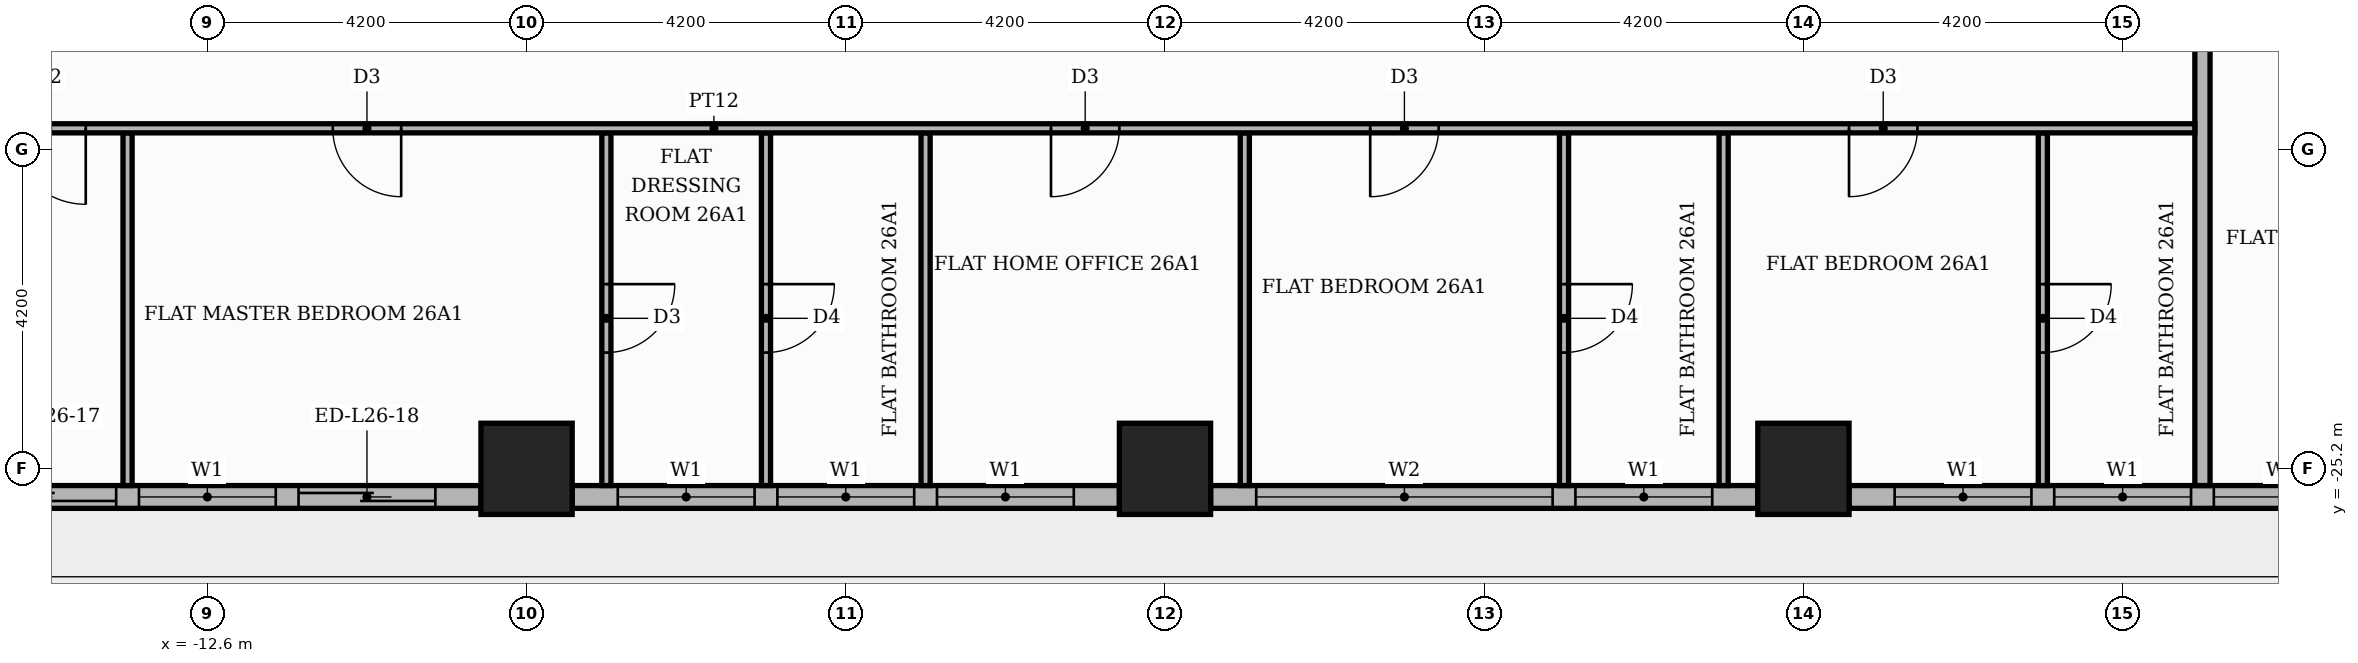
"""IFC4 building model, lengths in metres.
Left out: names, types, materials, properties, quantities, classifications, styles, units other than length and angle.
Written with IfcOpenShell. Run it as: python <this file> out.ifc"""

import sys

from ifc_helpers import new_model, si_unit, direction, frame, frame_2d, origin, origin_2d, place, context, subcontext, project, spatial, rectangle, extrude, element, fill, save


model = new_model("IFC4")
c1 = context("Model", 3, precision=1e-05, world=origin(), true_north=direction((0.0, 1.0)))
c2 = subcontext(c1, "Body", "Model", "MODEL_VIEW")
j1 = project(units=[si_unit("LENGTHUNIT", "METRE"), si_unit("PLANEANGLEUNIT", "RADIAN")], contexts=[c1])
p1 = place(None, origin())
s1 = spatial("IfcSite", under=j1, at=p1, CompositionType="ELEMENT")
p2 = place(p1, origin())
s2 = spatial("IfcBuilding", under=s1, at=p2, CompositionType="ELEMENT")
p3 = place(p2, frame((0.0, 0.0, 110.4)))
s3 = spatial("IfcBuildingStorey", under=s2, at=p3, CompositionType="ELEMENT", Elevation=110.4)
for number, where, z_axis, x_axis in (
    (1, (0.0, -25.2, 0.0), (0.0, 0.0, 1.0), (1.0, 0.0, 0.0)),
    (2, (8.4, -25.2, 0.0), (0.0, 0.0, 1.0), (1.0, 0.0, 0.0)),
    (3, (-8.4, -25.2, 0.0), (0.0, 0.0, 1.0), (1.0, 0.0, 0.0)),
):
    element("IfcColumn", number, at=place(p3, frame(where, z_axis=z_axis, x_axis=x_axis)), inside=s3, PredefinedType="COLUMN", context=c2, shape_type="SweptSolid", body=[
        extrude(rectangle(XDim=1.2, YDim=1.2, at=origin_2d()), origin(), (0.0, 0.0, 1.0), 3.9),
    ])
p4 = place(p3, frame((-16.2, -25.57, 0.0), z_axis=(0.0, 0.0, 1.0), x_axis=(1.0, 0.0, 0.0)))
e4 = element("IfcWall", 4, at=p4, inside=s3, PredefinedType="STANDARD", context=c2, shape_type="SweptSolid", body=[
    extrude(rectangle(XDim=7.2, YDim=0.3, at=frame_2d((3.6, 0.0))), origin(), (0.0, 0.0, 1.0), 3.48),
])
p5 = place(p4, frame((0.6, 0.0, 0.0)))
e5 = element("IfcOpeningElement", 5, at=p5, cuts=e4, PredefinedType="OPENING", context=c2, shape_type="SweptSolid", body=[
    extrude(rectangle(XDim=1.8, YDim=2.4, at=frame_2d((0.9, 1.2))), frame((0.0, 0.16, 0.0), z_axis=(0.0, -1.0, 0.0), x_axis=(1.0, 0.0, 0.0)), (0.0, 0.0, 1.0), 0.32),
])
p6 = place(p4, frame((2.7, 0.0, 0.9)))
e6 = element("IfcOpeningElement", 6, at=p6, cuts=e4, PredefinedType="OPENING", context=c2, shape_type="SweptSolid", body=[
    extrude(rectangle(XDim=1.8, YDim=2.1, at=frame_2d((0.9, 1.05))), frame((0.0, 0.16, 0.0), z_axis=(0.0, -1.0, 0.0), x_axis=(1.0, 0.0, 0.0)), (0.0, 0.0, 1.0), 0.32),
])
p7 = place(p4, frame((4.8, 0.0, 0.0)))
e7 = element("IfcOpeningElement", 7, at=p7, cuts=e4, PredefinedType="OPENING", context=c2, shape_type="SweptSolid", body=[
    extrude(rectangle(XDim=1.8, YDim=2.4, at=frame_2d((0.9, 1.2))), frame((0.0, 0.16, 0.0), z_axis=(0.0, -1.0, 0.0), x_axis=(1.0, 0.0, 0.0)), (0.0, 0.0, 1.0), 0.32),
])
p8 = place(p3, frame((-7.8, -25.57, 0.0), z_axis=(0.0, 0.0, 1.0), x_axis=(1.0, 0.0, 0.0)))
e8 = element("IfcWall", 8, at=p8, inside=s3, PredefinedType="STANDARD", context=c2, shape_type="SweptSolid", body=[
    extrude(rectangle(XDim=7.2, YDim=0.3, at=frame_2d((3.6, 0.0))), origin(), (0.0, 0.0, 1.0), 3.48),
])
p9 = place(p8, frame((0.6, 0.0, 0.9)))
e9 = element("IfcOpeningElement", 9, at=p9, cuts=e8, PredefinedType="OPENING", context=c2, shape_type="SweptSolid", body=[
    extrude(rectangle(XDim=1.8, YDim=2.1, at=frame_2d((0.9, 1.05))), frame((0.0, 0.16, 0.0), z_axis=(0.0, -1.0, 0.0), x_axis=(1.0, 0.0, 0.0)), (0.0, 0.0, 1.0), 0.32),
])
p10 = place(p8, frame((2.7, 0.0, 0.9)))
e10 = element("IfcOpeningElement", 10, at=p10, cuts=e8, PredefinedType="OPENING", context=c2, shape_type="SweptSolid", body=[
    extrude(rectangle(XDim=1.8, YDim=2.1, at=frame_2d((0.9, 1.05))), frame((0.0, 0.16, 0.0), z_axis=(0.0, -1.0, 0.0), x_axis=(1.0, 0.0, 0.0)), (0.0, 0.0, 1.0), 0.32),
])
p11 = place(p8, frame((4.8, 0.0, 0.9)))
e11 = element("IfcOpeningElement", 11, at=p11, cuts=e8, PredefinedType="OPENING", context=c2, shape_type="SweptSolid", body=[
    extrude(rectangle(XDim=1.8, YDim=2.1, at=frame_2d((0.9, 1.05))), frame((0.0, 0.16, 0.0), z_axis=(0.0, -1.0, 0.0), x_axis=(1.0, 0.0, 0.0)), (0.0, 0.0, 1.0), 0.32),
])
p12 = place(p3, frame((0.6, -25.57, 0.0), z_axis=(0.0, 0.0, 1.0), x_axis=(1.0, 0.0, 0.0)))
e12 = element("IfcWall", 12, at=p12, inside=s3, PredefinedType="STANDARD", context=c2, shape_type="SweptSolid", body=[
    extrude(rectangle(XDim=7.2, YDim=0.3, at=frame_2d((3.6, 0.0))), origin(), (0.0, 0.0, 1.0), 3.48),
])
p13 = place(p12, frame((0.6, 0.0, 0.9)))
e13 = element("IfcOpeningElement", 13, at=p13, cuts=e12, PredefinedType="OPENING", context=c2, shape_type="SweptSolid", body=[
    extrude(rectangle(XDim=3.9, YDim=2.1, at=frame_2d((1.95, 1.05))), frame((0.0, 0.16, 0.0), z_axis=(0.0, -1.0, 0.0), x_axis=(1.0, 0.0, 0.0)), (0.0, 0.0, 1.0), 0.32),
])
p14 = place(p12, frame((4.8, 0.0, 0.9)))
e14 = element("IfcOpeningElement", 14, at=p14, cuts=e12, PredefinedType="OPENING", context=c2, shape_type="SweptSolid", body=[
    extrude(rectangle(XDim=1.8, YDim=2.1, at=frame_2d((0.9, 1.05))), frame((0.0, 0.16, 0.0), z_axis=(0.0, -1.0, 0.0), x_axis=(1.0, 0.0, 0.0)), (0.0, 0.0, 1.0), 0.32),
])
p15 = place(p3, frame((9.0, -25.57, 0.0), z_axis=(0.0, 0.0, 1.0), x_axis=(1.0, 0.0, 0.0)))
e15 = element("IfcWall", 15, at=p15, inside=s3, PredefinedType="STANDARD", context=c2, shape_type="SweptSolid", body=[
    extrude(rectangle(XDim=7.2, YDim=0.3, at=frame_2d((3.6, 0.0))), origin(), (0.0, 0.0, 1.0), 3.48),
])
p16 = place(p15, frame((0.6, 0.0, 0.9)))
e16 = element("IfcOpeningElement", 16, at=p16, cuts=e15, PredefinedType="OPENING", context=c2, shape_type="SweptSolid", body=[
    extrude(rectangle(XDim=1.8, YDim=2.1, at=frame_2d((0.9, 1.05))), frame((0.0, 0.16, 0.0), z_axis=(0.0, -1.0, 0.0), x_axis=(1.0, 0.0, 0.0)), (0.0, 0.0, 1.0), 0.32),
])
p17 = place(p15, frame((2.7, 0.0, 0.9)))
e17 = element("IfcOpeningElement", 17, at=p17, cuts=e15, PredefinedType="OPENING", context=c2, shape_type="SweptSolid", body=[
    extrude(rectangle(XDim=1.8, YDim=2.1, at=frame_2d((0.9, 1.05))), frame((0.0, 0.16, 0.0), z_axis=(0.0, -1.0, 0.0), x_axis=(1.0, 0.0, 0.0)), (0.0, 0.0, 1.0), 0.32),
])
p18 = place(p15, frame((4.8, 0.0, 0.9)))
e18 = element("IfcOpeningElement", 18, at=p18, cuts=e15, PredefinedType="OPENING", context=c2, shape_type="SweptSolid", body=[
    extrude(rectangle(XDim=1.8, YDim=2.1, at=frame_2d((0.9, 1.05))), frame((0.0, 0.16, 0.0), z_axis=(0.0, -1.0, 0.0), x_axis=(1.0, 0.0, 0.0)), (0.0, 0.0, 1.0), 0.32),
])
p19 = place(p3, frame((-13.65, -25.42, 0.0), z_axis=(0.0, 0.0, 1.0), x_axis=(0.0, 1.0, 0.0)))
e19 = element("IfcWall", 19, at=p19, inside=s3, PredefinedType="PARTITIONING", context=c2, shape_type="SweptSolid", body=[
    extrude(rectangle(XDim=4.64, YDim=0.12, at=frame_2d((2.32, 0.0))), origin(), (0.0, 0.0, 1.0), 3.48),
])
p20 = place(p3, frame((-7.35, -25.42, 0.0), z_axis=(0.0, 0.0, 1.0), x_axis=(0.0, 1.0, 0.0)))
e20 = element("IfcWall", 20, at=p20, inside=s3, PredefinedType="PARTITIONING", context=c2, shape_type="SweptSolid", body=[
    extrude(rectangle(XDim=4.64, YDim=0.12, at=frame_2d((2.32, 0.0))), origin(), (0.0, 0.0, 1.0), 3.48),
])
p21 = place(p20, frame((1.75, 0.0, 0.0)))
e21 = element("IfcOpeningElement", 21, at=p21, cuts=e20, PredefinedType="OPENING", context=c2, shape_type="SweptSolid", body=[
    extrude(rectangle(XDim=0.9, YDim=2.1, at=frame_2d((0.45, 1.05))), frame((0.0, 0.07, 0.0), z_axis=(0.0, -1.0, 0.0), x_axis=(1.0, 0.0, 0.0)), (0.0, 0.0, 1.0), 0.14),
])
p22 = place(p3, frame((-5.25, -25.42, 0.0), z_axis=(0.0, 0.0, 1.0), x_axis=(0.0, 1.0, 0.0)))
e22 = element("IfcWall", 22, at=p22, inside=s3, PredefinedType="PARTITIONING", context=c2, shape_type="SweptSolid", body=[
    extrude(rectangle(XDim=4.64, YDim=0.12, at=frame_2d((2.32, 0.0))), origin(), (0.0, 0.0, 1.0), 3.48),
])
p23 = place(p22, frame((1.75, 0.0, 0.0)))
e23 = element("IfcOpeningElement", 23, at=p23, cuts=e22, PredefinedType="OPENING", context=c2, shape_type="SweptSolid", body=[
    extrude(rectangle(XDim=0.9, YDim=2.1, at=frame_2d((0.45, 1.05))), frame((0.0, 0.07, 0.0), z_axis=(0.0, -1.0, 0.0), x_axis=(1.0, 0.0, 0.0)), (0.0, 0.0, 1.0), 0.14),
])
for number, where, z_axis, x_axis in (
    (24, (-3.15, -25.42, 0.0), (0.0, 0.0, 1.0), (0.0, 1.0, 0.0)),
    (25, (1.05, -25.42, 0.0), (0.0, 0.0, 1.0), (0.0, 1.0, 0.0)),
):
    element("IfcWall", number, at=place(p3, frame(where, z_axis=z_axis, x_axis=x_axis)), inside=s3, PredefinedType="PARTITIONING", context=c2, shape_type="SweptSolid", body=[
        extrude(rectangle(XDim=4.64, YDim=0.12, at=frame_2d((2.32, 0.0))), origin(), (0.0, 0.0, 1.0), 3.48),
    ])
p24 = place(p3, frame((5.25, -25.42, 0.0), z_axis=(0.0, 0.0, 1.0), x_axis=(0.0, 1.0, 0.0)))
e26 = element("IfcWall", 26, at=p24, inside=s3, PredefinedType="PARTITIONING", context=c2, shape_type="SweptSolid", body=[
    extrude(rectangle(XDim=4.64, YDim=0.12, at=frame_2d((2.32, 0.0))), origin(), (0.0, 0.0, 1.0), 3.48),
])
p25 = place(p24, frame((1.75, 0.0, 0.0)))
e27 = element("IfcOpeningElement", 27, at=p25, cuts=e26, PredefinedType="OPENING", context=c2, shape_type="SweptSolid", body=[
    extrude(rectangle(XDim=0.9, YDim=2.1, at=frame_2d((0.45, 1.05))), frame((0.0, 0.07, 0.0), z_axis=(0.0, -1.0, 0.0), x_axis=(1.0, 0.0, 0.0)), (0.0, 0.0, 1.0), 0.14),
])
p26 = place(p3, frame((7.35, -25.42, 0.0), z_axis=(0.0, 0.0, 1.0), x_axis=(0.0, 1.0, 0.0)))
e28 = element("IfcWall", 28, at=p26, inside=s3, PredefinedType="PARTITIONING", context=c2, shape_type="SweptSolid", body=[
    extrude(rectangle(XDim=4.64, YDim=0.12, at=frame_2d((2.32, 0.0))), origin(), (0.0, 0.0, 1.0), 3.48),
])
p27 = place(p3, frame((11.55, -25.42, 0.0), z_axis=(0.0, 0.0, 1.0), x_axis=(0.0, 1.0, 0.0)))
e29 = element("IfcWall", 29, at=p27, inside=s3, PredefinedType="PARTITIONING", context=c2, shape_type="SweptSolid", body=[
    extrude(rectangle(XDim=4.64, YDim=0.12, at=frame_2d((2.32, 0.0))), origin(), (0.0, 0.0, 1.0), 3.48),
])
p28 = place(p27, frame((1.75, 0.0, 0.0)))
e30 = element("IfcOpeningElement", 30, at=p28, cuts=e29, PredefinedType="OPENING", context=c2, shape_type="SweptSolid", body=[
    extrude(rectangle(XDim=0.9, YDim=2.1, at=frame_2d((0.45, 1.05))), frame((0.0, 0.07, 0.0), z_axis=(0.0, -1.0, 0.0), x_axis=(1.0, 0.0, 0.0)), (0.0, 0.0, 1.0), 0.14),
])
p29 = place(p3, frame((13.65, -25.42, 0.0), z_axis=(0.0, 0.0, 1.0), x_axis=(0.0, 1.0, 0.0)))
e31 = element("IfcWall", 31, at=p29, inside=s3, PredefinedType="PARTITIONING", context=c2, shape_type="SweptSolid", body=[
    extrude(rectangle(XDim=11.67, YDim=0.2, at=frame_2d((5.835, 0.0))), origin(), (0.0, 0.0, 1.0), 3.48),
])
p30 = place(p3, frame((-25.42, -20.72, 0.0), z_axis=(0.0, 0.0, 1.0), x_axis=(1.0, 0.0, 0.0)))
e32 = element("IfcWall", 32, at=p30, inside=s3, PredefinedType="PARTITIONING", context=c2, shape_type="SweptSolid", body=[
    extrude(rectangle(XDim=38.97, YDim=0.12, at=frame_2d((19.485, 0.0))), origin(), (0.0, 0.0, 1.0), 3.48),
])
p31 = place(p30, frame((10.22, 0.0, 0.0)))
e33 = element("IfcOpeningElement", 33, at=p31, cuts=e32, PredefinedType="OPENING", context=c2, shape_type="SweptSolid", body=[
    extrude(rectangle(XDim=1.0, YDim=2.1, at=frame_2d((0.5, 1.05))), frame((0.0, 0.07, 0.0), z_axis=(0.0, -1.0, 0.0), x_axis=(1.0, 0.0, 0.0)), (0.0, 0.0, 1.0), 0.14),
])
p32 = place(p30, frame((14.47, 0.0, 0.0)))
e34 = element("IfcOpeningElement", 34, at=p32, cuts=e32, PredefinedType="OPENING", context=c2, shape_type="SweptSolid", body=[
    extrude(rectangle(XDim=0.9, YDim=2.1, at=frame_2d((0.45, 1.05))), frame((0.0, 0.07, 0.0), z_axis=(0.0, -1.0, 0.0), x_axis=(1.0, 0.0, 0.0)), (0.0, 0.0, 1.0), 0.14),
])
p33 = place(p30, frame((23.92, 0.0, 0.0)))
e35 = element("IfcOpeningElement", 35, at=p33, cuts=e32, PredefinedType="OPENING", context=c2, shape_type="SweptSolid", body=[
    extrude(rectangle(XDim=0.9, YDim=2.1, at=frame_2d((0.45, 1.05))), frame((0.0, 0.07, 0.0), z_axis=(0.0, -1.0, 0.0), x_axis=(1.0, 0.0, 0.0)), (0.0, 0.0, 1.0), 0.14),
])
p34 = place(p30, frame((28.12, 0.0, 0.0)))
e36 = element("IfcOpeningElement", 36, at=p34, cuts=e32, PredefinedType="OPENING", context=c2, shape_type="SweptSolid", body=[
    extrude(rectangle(XDim=0.9, YDim=2.1, at=frame_2d((0.45, 1.05))), frame((0.0, 0.07, 0.0), z_axis=(0.0, -1.0, 0.0), x_axis=(1.0, 0.0, 0.0)), (0.0, 0.0, 1.0), 0.14),
])
p35 = place(p30, frame((34.42, 0.0, 0.0)))
e37 = element("IfcOpeningElement", 37, at=p35, cuts=e32, PredefinedType="OPENING", context=c2, shape_type="SweptSolid", body=[
    extrude(rectangle(XDim=0.9, YDim=2.1, at=frame_2d((0.45, 1.05))), frame((0.0, 0.07, 0.0), z_axis=(0.0, -1.0, 0.0), x_axis=(1.0, 0.0, 0.0)), (0.0, 0.0, 1.0), 0.14),
])
p36 = place(p5, origin())
e38 = element("IfcDoor", 38, at=p36, inside=s3, OperationType="SLIDING_TO_LEFT", PredefinedType="DOOR", context=c2, shape_type="SweptSolid", body=[
    extrude(rectangle(XDim=1.8, YDim=2.4, at=frame_2d((0.9, 1.2))), frame((0.0, 0.025, 0.0), z_axis=(0.0, -1.0, 0.0), x_axis=(1.0, 0.0, 0.0)), (0.0, 0.0, 1.0), 0.05),
])
fill(e5, e38)
p37 = place(p6, origin())
e39 = element("IfcWindow", 39, at=p37, inside=s3, PartitioningType="SINGLE_PANEL", PredefinedType="WINDOW", context=c2, shape_type="SweptSolid", body=[
    extrude(rectangle(XDim=1.8, YDim=2.1, at=frame_2d((0.9, 1.05))), frame((0.0, 0.03, 0.0), z_axis=(0.0, -1.0, 0.0), x_axis=(1.0, 0.0, 0.0)), (0.0, 0.0, 1.0), 0.06),
])
fill(e6, e39)
p38 = place(p7, origin())
e40 = element("IfcDoor", 40, at=p38, inside=s3, OperationType="SLIDING_TO_RIGHT", PredefinedType="DOOR", context=c2, shape_type="SweptSolid", body=[
    extrude(rectangle(XDim=1.8, YDim=2.4, at=frame_2d((0.9, 1.2))), frame((0.0, 0.025, 0.0), z_axis=(0.0, -1.0, 0.0), x_axis=(1.0, 0.0, 0.0)), (0.0, 0.0, 1.0), 0.05),
])
fill(e7, e40)
p39 = place(p9, origin())
e41 = element("IfcWindow", 41, at=p39, inside=s3, PartitioningType="SINGLE_PANEL", PredefinedType="WINDOW", context=c2, shape_type="SweptSolid", body=[
    extrude(rectangle(XDim=1.8, YDim=2.1, at=frame_2d((0.9, 1.05))), frame((0.0, 0.03, 0.0), z_axis=(0.0, -1.0, 0.0), x_axis=(1.0, 0.0, 0.0)), (0.0, 0.0, 1.0), 0.06),
])
fill(e9, e41)
p40 = place(p10, origin())
e42 = element("IfcWindow", 42, at=p40, inside=s3, PartitioningType="SINGLE_PANEL", PredefinedType="WINDOW", context=c2, shape_type="SweptSolid", body=[
    extrude(rectangle(XDim=1.8, YDim=2.1, at=frame_2d((0.9, 1.05))), frame((0.0, 0.03, 0.0), z_axis=(0.0, -1.0, 0.0), x_axis=(1.0, 0.0, 0.0)), (0.0, 0.0, 1.0), 0.06),
])
fill(e10, e42)
p41 = place(p11, origin())
e43 = element("IfcWindow", 43, at=p41, inside=s3, PartitioningType="SINGLE_PANEL", PredefinedType="WINDOW", context=c2, shape_type="SweptSolid", body=[
    extrude(rectangle(XDim=1.8, YDim=2.1, at=frame_2d((0.9, 1.05))), frame((0.0, 0.03, 0.0), z_axis=(0.0, -1.0, 0.0), x_axis=(1.0, 0.0, 0.0)), (0.0, 0.0, 1.0), 0.06),
])
fill(e11, e43)
p42 = place(p13, origin())
e44 = element("IfcWindow", 44, at=p42, inside=s3, PartitioningType="SINGLE_PANEL", PredefinedType="WINDOW", context=c2, shape_type="SweptSolid", body=[
    extrude(rectangle(XDim=3.9, YDim=2.1, at=frame_2d((1.95, 1.05))), frame((0.0, 0.03, 0.0), z_axis=(0.0, -1.0, 0.0), x_axis=(1.0, 0.0, 0.0)), (0.0, 0.0, 1.0), 0.06),
])
fill(e13, e44)
p43 = place(p14, origin())
e45 = element("IfcWindow", 45, at=p43, inside=s3, PartitioningType="SINGLE_PANEL", PredefinedType="WINDOW", context=c2, shape_type="SweptSolid", body=[
    extrude(rectangle(XDim=1.8, YDim=2.1, at=frame_2d((0.9, 1.05))), frame((0.0, 0.03, 0.0), z_axis=(0.0, -1.0, 0.0), x_axis=(1.0, 0.0, 0.0)), (0.0, 0.0, 1.0), 0.06),
])
fill(e14, e45)
p44 = place(p16, origin())
e46 = element("IfcWindow", 46, at=p44, inside=s3, PartitioningType="SINGLE_PANEL", PredefinedType="WINDOW", context=c2, shape_type="SweptSolid", body=[
    extrude(rectangle(XDim=1.8, YDim=2.1, at=frame_2d((0.9, 1.05))), frame((0.0, 0.03, 0.0), z_axis=(0.0, -1.0, 0.0), x_axis=(1.0, 0.0, 0.0)), (0.0, 0.0, 1.0), 0.06),
])
fill(e16, e46)
p45 = place(p17, origin())
e47 = element("IfcWindow", 47, at=p45, inside=s3, PartitioningType="SINGLE_PANEL", PredefinedType="WINDOW", context=c2, shape_type="SweptSolid", body=[
    extrude(rectangle(XDim=1.8, YDim=2.1, at=frame_2d((0.9, 1.05))), frame((0.0, 0.03, 0.0), z_axis=(0.0, -1.0, 0.0), x_axis=(1.0, 0.0, 0.0)), (0.0, 0.0, 1.0), 0.06),
])
fill(e17, e47)
p46 = place(p18, origin())
e48 = element("IfcWindow", 48, at=p46, inside=s3, PartitioningType="SINGLE_PANEL", PredefinedType="WINDOW", context=c2, shape_type="SweptSolid", body=[
    extrude(rectangle(XDim=1.8, YDim=2.1, at=frame_2d((0.9, 1.05))), frame((0.0, 0.03, 0.0), z_axis=(0.0, -1.0, 0.0), x_axis=(1.0, 0.0, 0.0)), (0.0, 0.0, 1.0), 0.06),
])
fill(e18, e48)
p47 = place(p31, frame((1.0, 0.0, 0.0), z_axis=(0.0, 0.0, 1.0), x_axis=(-1.0, 0.0, 0.0)))
e49 = element("IfcDoor", 49, at=p47, inside=s3, OperationType="SINGLE_SWING_RIGHT", PredefinedType="DOOR", context=c2, shape_type="SweptSolid", body=[
    extrude(rectangle(XDim=1.0, YDim=2.1, at=frame_2d((0.5, 1.05))), frame((0.0, 0.025, 0.0), z_axis=(0.0, -1.0, 0.0), x_axis=(1.0, 0.0, 0.0)), (0.0, 0.0, 1.0), 0.05),
])
fill(e33, e49)
p48 = place(p32, frame((0.9, 0.0, 0.0), z_axis=(0.0, 0.0, 1.0), x_axis=(-1.0, 0.0, 0.0)))
e50 = element("IfcDoor", 50, at=p48, inside=s3, OperationType="SINGLE_SWING_RIGHT", PredefinedType="DOOR", context=c2, shape_type="SweptSolid", body=[
    extrude(rectangle(XDim=0.9, YDim=2.1, at=frame_2d((0.45, 1.05))), frame((0.0, 0.025, 0.0), z_axis=(0.0, -1.0, 0.0), x_axis=(1.0, 0.0, 0.0)), (0.0, 0.0, 1.0), 0.05),
])
fill(e34, e50)
p49 = place(p21, frame((0.9, 0.0, 0.0), z_axis=(0.0, 0.0, 1.0), x_axis=(-1.0, 0.0, 0.0)))
e51 = element("IfcDoor", 51, at=p49, inside=s3, OperationType="SINGLE_SWING_RIGHT", PredefinedType="DOOR", context=c2, shape_type="SweptSolid", body=[
    extrude(rectangle(XDim=0.9, YDim=2.1, at=frame_2d((0.45, 1.05))), frame((0.0, 0.025, 0.0), z_axis=(0.0, -1.0, 0.0), x_axis=(1.0, 0.0, 0.0)), (0.0, 0.0, 1.0), 0.05),
])
fill(e21, e51)
p50 = place(p23, frame((0.9, 0.0, 0.0), z_axis=(0.0, 0.0, 1.0), x_axis=(-1.0, 0.0, 0.0)))
e52 = element("IfcDoor", 52, at=p50, inside=s3, OperationType="SINGLE_SWING_RIGHT", PredefinedType="DOOR", context=c2, shape_type="SweptSolid", body=[
    extrude(rectangle(XDim=0.9, YDim=2.1, at=frame_2d((0.45, 1.05))), frame((0.0, 0.025, 0.0), z_axis=(0.0, -1.0, 0.0), x_axis=(1.0, 0.0, 0.0)), (0.0, 0.0, 1.0), 0.05),
])
fill(e23, e52)
p51 = place(p33, frame((0.9, 0.0, 0.0), z_axis=(0.0, 0.0, 1.0), x_axis=(-1.0, 0.0, 0.0)))
e53 = element("IfcDoor", 53, at=p51, inside=s3, OperationType="SINGLE_SWING_LEFT", PredefinedType="DOOR", context=c2, shape_type="SweptSolid", body=[
    extrude(rectangle(XDim=0.9, YDim=2.1, at=frame_2d((0.45, 1.05))), frame((0.0, 0.025, 0.0), z_axis=(0.0, -1.0, 0.0), x_axis=(1.0, 0.0, 0.0)), (0.0, 0.0, 1.0), 0.05),
])
fill(e35, e53)
p52 = place(p34, frame((0.9, 0.0, 0.0), z_axis=(0.0, 0.0, 1.0), x_axis=(-1.0, 0.0, 0.0)))
e54 = element("IfcDoor", 54, at=p52, inside=s3, OperationType="SINGLE_SWING_LEFT", PredefinedType="DOOR", context=c2, shape_type="SweptSolid", body=[
    extrude(rectangle(XDim=0.9, YDim=2.1, at=frame_2d((0.45, 1.05))), frame((0.0, 0.025, 0.0), z_axis=(0.0, -1.0, 0.0), x_axis=(1.0, 0.0, 0.0)), (0.0, 0.0, 1.0), 0.05),
])
fill(e36, e54)
p53 = place(p25, frame((0.9, 0.0, 0.0), z_axis=(0.0, 0.0, 1.0), x_axis=(-1.0, 0.0, 0.0)))
e55 = element("IfcDoor", 55, at=p53, inside=s3, OperationType="SINGLE_SWING_RIGHT", PredefinedType="DOOR", context=c2, shape_type="SweptSolid", body=[
    extrude(rectangle(XDim=0.9, YDim=2.1, at=frame_2d((0.45, 1.05))), frame((0.0, 0.025, 0.0), z_axis=(0.0, -1.0, 0.0), x_axis=(1.0, 0.0, 0.0)), (0.0, 0.0, 1.0), 0.05),
])
fill(e27, e55)
p54 = place(p35, frame((0.9, 0.0, 0.0), z_axis=(0.0, 0.0, 1.0), x_axis=(-1.0, 0.0, 0.0)))
e56 = element("IfcDoor", 56, at=p54, inside=s3, OperationType="SINGLE_SWING_LEFT", PredefinedType="DOOR", context=c2, shape_type="SweptSolid", body=[
    extrude(rectangle(XDim=0.9, YDim=2.1, at=frame_2d((0.45, 1.05))), frame((0.0, 0.025, 0.0), z_axis=(0.0, -1.0, 0.0), x_axis=(1.0, 0.0, 0.0)), (0.0, 0.0, 1.0), 0.05),
])
fill(e37, e56)
p55 = place(p28, frame((0.9, 0.0, 0.0), z_axis=(0.0, 0.0, 1.0), x_axis=(-1.0, 0.0, 0.0)))
e57 = element("IfcDoor", 57, at=p55, inside=s3, OperationType="SINGLE_SWING_RIGHT", PredefinedType="DOOR", context=c2, shape_type="SweptSolid", body=[
    extrude(rectangle(XDim=0.9, YDim=2.1, at=frame_2d((0.45, 1.05))), frame((0.0, 0.025, 0.0), z_axis=(0.0, -1.0, 0.0), x_axis=(1.0, 0.0, 0.0)), (0.0, 0.0, 1.0), 0.05),
])
fill(e30, e57)
save(model, sys.argv[1])
